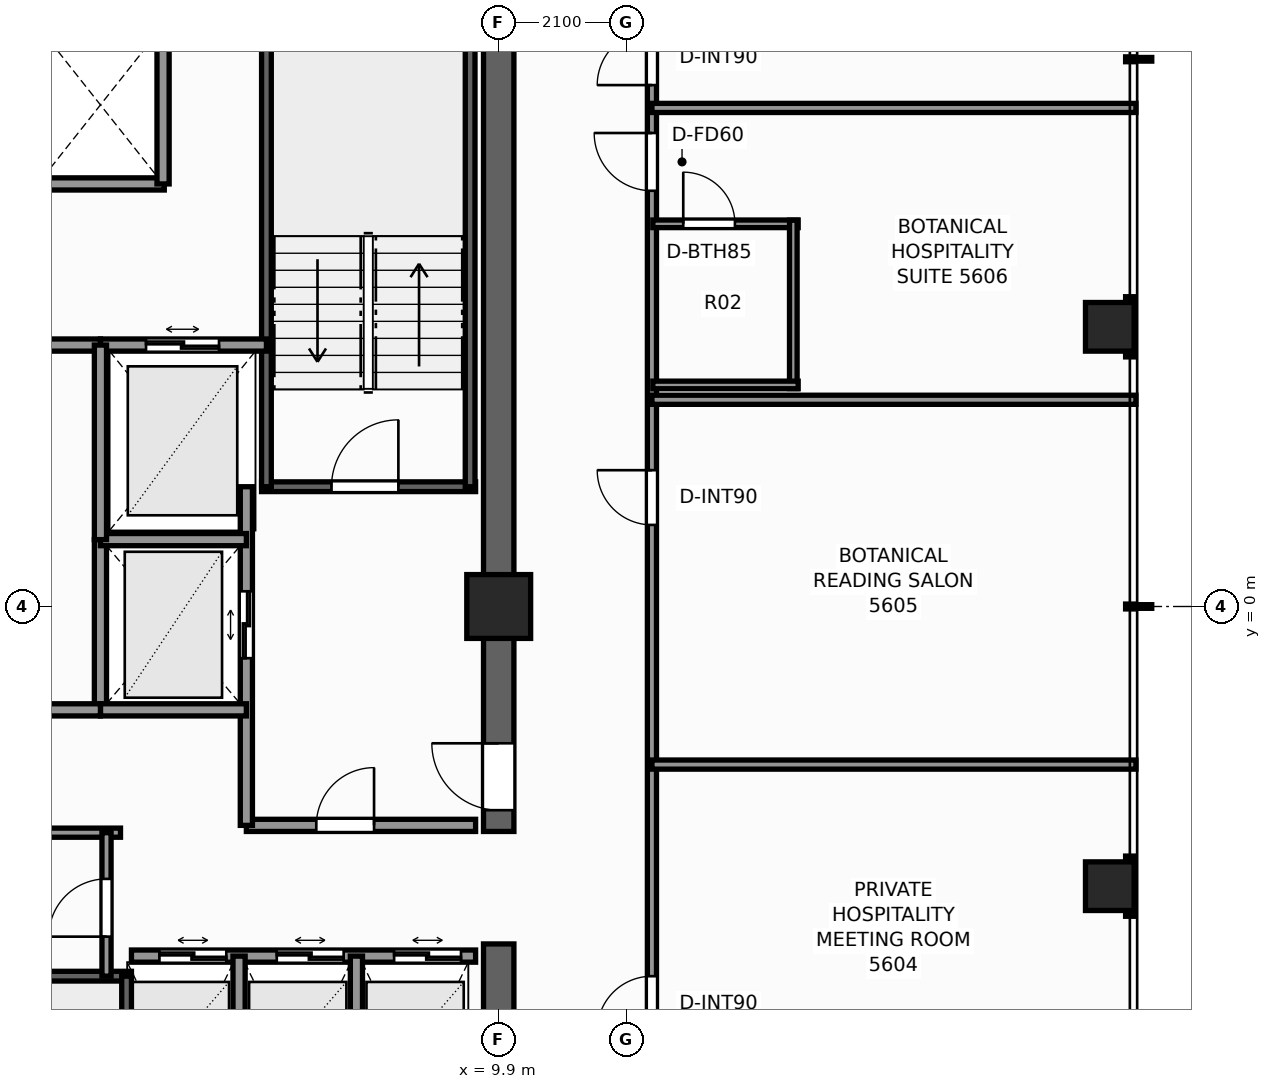
"""IFC4 building model, lengths in metres.
Left out: names, types, materials, properties, quantities, classifications, styles, units other than length and angle.
Written with IfcOpenShell. Run it as: python <this file> out.ifc"""

import sys

from ifc_helpers import new_model, si_unit, direction, frame, frame_2d, origin, origin_2d, place, context, subcontext, project, spatial, rectangle, extrude, element, fill, save


model = new_model("IFC4")
c1 = context("Model", 3, precision=1e-05, world=origin(), true_north=direction((0.0, 1.0)))
c2 = subcontext(c1, "Body", "Model", "MODEL_VIEW")
j1 = project(units=[si_unit("LENGTHUNIT", "METRE"), si_unit("PLANEANGLEUNIT", "RADIAN")], contexts=[c1])
p1 = place(None, origin())
s1 = spatial("IfcSite", under=j1, at=p1, CompositionType="ELEMENT")
p2 = place(p1, origin())
s2 = spatial("IfcBuilding", under=s1, at=p2, CompositionType="ELEMENT")
p3 = place(p2, frame((0.0, 0.0, 193.2)))
s3 = spatial("IfcBuildingStorey", under=s2, at=p3, CompositionType="ELEMENT", Elevation=193.2)
p4 = place(p3, frame((9.9, -9.65, 0.0), z_axis=(0.0, 0.0, 1.0), x_axis=(0.0, 1.0, 0.0)))
e1 = element("IfcWall", 1, at=p4, inside=s3, PredefinedType="SHEAR", context=c2, shape_type="SweptSolid", body=[
    extrude(rectangle(XDim=4.1, YDim=0.5, at=frame_2d((2.05, 0.0))), origin(), (0.0, 0.0, 1.0), 3.3),
])
p5 = place(p3, frame((9.9, -3.7, 0.0), z_axis=(0.0, 0.0, 1.0), x_axis=(0.0, 1.0, 0.0)))
e2 = element("IfcWall", 2, at=p5, inside=s3, PredefinedType="SHEAR", context=c2, shape_type="SweptSolid", body=[
    extrude(rectangle(XDim=13.35, YDim=0.5, at=frame_2d((6.675, 0.0))), origin(), (0.0, 0.0, 1.0), 3.3),
])
p6 = place(p5, frame((0.35, 0.0, 0.0)))
e3 = element("IfcOpeningElement", 3, at=p6, cuts=e2, PredefinedType="OPENING", context=c2, shape_type="SweptSolid", body=[
    extrude(rectangle(XDim=1.1, YDim=2.2, at=frame_2d((0.55, 1.1))), frame((0.0, 0.26, 0.0), z_axis=(0.0, -1.0, 0.0), x_axis=(1.0, 0.0, 0.0)), (0.0, 0.0, 1.0), 0.52),
])
p7 = place(p3, frame((9.9, 0.0, 0.0), z_axis=(0.0, 0.0, 1.0), x_axis=(1.0, 0.0, 0.0)))
e4 = element("IfcColumn", 4, at=p7, inside=s3, PredefinedType="COLUMN", context=c2, shape_type="SweptSolid", body=[
    extrude(rectangle(XDim=1.05, YDim=1.05, at=origin_2d()), origin(), (0.0, 0.0, 1.0), 3.3),
])
for number, where, z_axis, x_axis in (
    (5, (19.95, -4.6, 0.0), (0.0, 0.0, 1.0), (1.0, 0.0, 0.0)),
    (6, (19.95, 4.6, 0.0), (0.0, 0.0, 1.0), (1.0, 0.0, 0.0)),
):
    element("IfcColumn", number, at=place(p3, frame(where, z_axis=z_axis, x_axis=x_axis)), inside=s3, PredefinedType="COLUMN", context=c2, shape_type="SweptSolid", body=[
        extrude(rectangle(XDim=0.8, YDim=0.8, at=origin_2d()), origin(), (0.0, 0.0, 1.0), 3.3),
    ])
p8 = place(p3, frame((6.0, 1.97, 0.0), z_axis=(0.0, 0.0, 1.0), x_axis=(1.0, 0.0, 0.0)))
e7 = element("IfcWall", 7, at=p8, inside=s3, PredefinedType="SHEAR", context=c2, shape_type="SweptSolid", body=[
    extrude(rectangle(XDim=3.52, YDim=0.16, at=frame_2d((1.76, 0.0))), origin(), (0.0, 0.0, 1.0), 3.3),
])
p9 = place(p8, frame((1.15, 0.0, 0.0)))
e8 = element("IfcOpeningElement", 8, at=p9, cuts=e7, PredefinedType="OPENING", context=c2, shape_type="SweptSolid", body=[
    extrude(rectangle(XDim=1.1, YDim=2.2, at=frame_2d((0.55, 1.1))), frame((0.0, 0.09, 0.0), z_axis=(0.0, -1.0, 0.0), x_axis=(1.0, 0.0, 0.0)), (0.0, 0.0, 1.0), 0.18),
])
for number, where, z_axis, x_axis in (
    (9, (6.08, 1.97, 0.0), (0.0, 0.0, 1.0), (0.0, 1.0, 0.0)),
    (10, (9.43, 1.97, 0.0), (0.0, 0.0, 1.0), (0.0, 1.0, 0.0)),
):
    element("IfcWall", number, at=place(p3, frame(where, z_axis=z_axis, x_axis=x_axis)), inside=s3, PredefinedType="SHEAR", context=c2, shape_type="SweptSolid", body=[
        extrude(rectangle(XDim=7.56, YDim=0.16, at=frame_2d((3.78, 0.0))), origin(), (0.0, 0.0, 1.0), 3.3),
    ])
p10 = place(p3, frame((-3.86, -6.08, 0.0), z_axis=(0.0, 0.0, 1.0), x_axis=(1.0, 0.0, 0.0)))
e11 = element("IfcWall", 11, at=p10, inside=s3, PredefinedType="SHEAR", context=c2, shape_type="SweptSolid", body=[
    extrude(rectangle(XDim=7.72, YDim=0.16, at=frame_2d((3.86, 0.0))), origin(), (0.0, 0.0, 1.0), 3.3),
])
p11 = place(p3, frame((3.78, -9.43, 0.0), z_axis=(0.0, 0.0, 1.0), x_axis=(0.0, 1.0, 0.0)))
e12 = element("IfcWall", 12, at=p11, inside=s3, PredefinedType="SHEAR", context=c2, shape_type="SweptSolid", body=[
    extrude(rectangle(XDim=3.35, YDim=0.16, at=frame_2d((1.675, 0.0))), origin(), (0.0, 0.0, 1.0), 3.3),
])
p12 = place(p3, frame((5.75, -3.6, 0.0), z_axis=(0.0, 0.0, 1.0), x_axis=(1.0, 0.0, 0.0)))
e13 = element("IfcWall", 13, at=p12, inside=s3, PredefinedType="SOLIDWALL", context=c2, shape_type="SweptSolid", body=[
    extrude(rectangle(XDim=3.77, YDim=0.2, at=frame_2d((1.885, 0.0))), origin(), (0.0, 0.0, 1.0), 3.08),
])
p13 = place(p12, frame((1.15, 0.0, 0.0)))
e14 = element("IfcOpeningElement", 14, at=p13, cuts=e13, PredefinedType="OPENING", context=c2, shape_type="SweptSolid", body=[
    extrude(rectangle(XDim=0.95, YDim=2.06, at=frame_2d((0.475, 1.03))), frame((0.0, 0.11, 0.0), z_axis=(0.0, -1.0, 0.0), x_axis=(1.0, 0.0, 0.0)), (0.0, 0.0, 1.0), 0.22),
])
p14 = place(p3, frame((5.75, -3.6, 0.0), z_axis=(0.0, 0.0, 1.0), x_axis=(0.0, 1.0, 0.0)))
e15 = element("IfcWall", 15, at=p14, inside=s3, PredefinedType="SOLIDWALL", context=c2, shape_type="SweptSolid", body=[
    extrude(rectangle(XDim=5.57, YDim=0.2, at=frame_2d((2.785, 0.0))), origin(), (0.0, 0.0, 1.0), 3.08),
])
p15 = place(p14, frame((2.75, 0.0, 0.0)))
e16 = element("IfcOpeningElement", 16, at=p15, cuts=e15, PredefinedType="OPENING", context=c2, shape_type="SweptSolid", body=[
    extrude(rectangle(XDim=1.1, YDim=2.2, at=frame_2d((0.55, 1.1))), frame((0.0, 0.11, 0.0), z_axis=(0.0, -1.0, 0.0), x_axis=(1.0, 0.0, 0.0)), (0.0, 0.0, 1.0), 0.22),
])
p16 = place(p3, frame((3.35, -1.7, 0.0), z_axis=(0.0, 0.0, 1.0), x_axis=(0.0, 1.0, 0.0)))
e17 = element("IfcWall", 17, at=p16, inside=s3, PredefinedType="SOLIDWALL", context=c2, shape_type="SweptSolid", body=[
    extrude(rectangle(XDim=2.8, YDim=0.2, at=frame_2d((1.4, 0.0))), origin(), (0.0, 0.0, 1.0), 3.08),
])
for number, where, z_axis, x_axis in (
    (18, (3.35, -1.7, 0.0), (0.0, 0.0, 1.0), (1.0, 0.0, 0.0)),
    (19, (3.35, 1.1, 0.0), (0.0, 0.0, 1.0), (1.0, 0.0, 0.0)),
):
    element("IfcWall", number, at=place(p3, frame(where, z_axis=z_axis, x_axis=x_axis)), inside=s3, PredefinedType="SOLIDWALL", context=c2, shape_type="SweptSolid", body=[
        extrude(rectangle(XDim=2.4, YDim=0.2, at=frame_2d((1.2, 0.0))), origin(), (0.0, 0.0, 1.0), 3.08),
    ])
p17 = place(p3, frame((3.35, 4.3, 0.0), z_axis=(0.0, 0.0, 1.0), x_axis=(1.0, 0.0, 0.0)))
e20 = element("IfcWall", 20, at=p17, inside=s3, PredefinedType="SOLIDWALL", context=c2, shape_type="SweptSolid", body=[
    extrude(rectangle(XDim=2.73, YDim=0.2, at=frame_2d((1.365, 0.0))), origin(), (0.0, 0.0, 1.0), 3.08),
])
p18 = place(p17, frame((0.75, 0.0, 0.0)))
e21 = element("IfcOpeningElement", 21, at=p18, cuts=e20, PredefinedType="OPENING", context=c2, shape_type="SweptSolid", body=[
    extrude(rectangle(XDim=1.2, YDim=2.25, at=frame_2d((0.6, 1.125))), frame((0.0, 0.11, 0.0), z_axis=(0.0, -1.0, 0.0), x_axis=(1.0, 0.0, 0.0)), (0.0, 0.0, 1.0), 0.22),
])
p19 = place(p3, frame((0.22, 6.95, 0.0), z_axis=(0.0, 0.0, 1.0), x_axis=(1.0, 0.0, 0.0)))
e22 = element("IfcWall", 22, at=p19, inside=s3, PredefinedType="SOLIDWALL", context=c2, shape_type="SweptSolid", body=[
    extrude(rectangle(XDim=4.18, YDim=0.2, at=frame_2d((2.09, 0.0))), origin(), (0.0, 0.0, 1.0), 3.08),
])
p20 = place(p3, frame((4.38, 6.95, 0.0), z_axis=(0.0, 0.0, 1.0), x_axis=(0.0, 1.0, 0.0)))
e23 = element("IfcWall", 23, at=p20, inside=s3, PredefinedType="SOLIDWALL", context=c2, shape_type="SweptSolid", body=[
    extrude(rectangle(XDim=2.57, YDim=0.2, at=frame_2d((1.285, 0.0))), origin(), (0.0, 0.0, 1.0), 3.08),
])
p21 = place(p3, frame((3.86, -5.75, 0.0), z_axis=(0.0, 0.0, 1.0), x_axis=(1.0, 0.0, 0.0)))
e24 = element("IfcWall", 24, at=p21, inside=s3, PredefinedType="SOLIDWALL", context=c2, shape_type="SweptSolid", body=[
    extrude(rectangle(XDim=5.66, YDim=0.2, at=frame_2d((2.83, 0.0))), origin(), (0.0, 0.0, 1.0), 3.08),
])
p22 = place(p21, frame((0.46, 0.0, 0.0)))
e25 = element("IfcOpeningElement", 25, at=p22, cuts=e24, PredefinedType="OPENING", context=c2, shape_type="SweptSolid", body=[
    extrude(rectangle(XDim=1.1, YDim=2.2, at=frame_2d((0.55, 1.1))), frame((0.0, 0.11, 0.0), z_axis=(0.0, -1.0, 0.0), x_axis=(1.0, 0.0, 0.0)), (0.0, 0.0, 1.0), 0.22),
])
p23 = place(p21, frame((2.39, 0.0, 0.0)))
e26 = element("IfcOpeningElement", 26, at=p23, cuts=e24, PredefinedType="OPENING", context=c2, shape_type="SweptSolid", body=[
    extrude(rectangle(XDim=1.1, YDim=2.2, at=frame_2d((0.55, 1.1))), frame((0.0, 0.11, 0.0), z_axis=(0.0, -1.0, 0.0), x_axis=(1.0, 0.0, 0.0)), (0.0, 0.0, 1.0), 0.22),
])
p24 = place(p21, frame((4.32, 0.0, 0.0)))
e27 = element("IfcOpeningElement", 27, at=p24, cuts=e24, PredefinedType="OPENING", context=c2, shape_type="SweptSolid", body=[
    extrude(rectangle(XDim=1.1, YDim=2.2, at=frame_2d((0.55, 1.1))), frame((0.0, 0.11, 0.0), z_axis=(0.0, -1.0, 0.0), x_axis=(1.0, 0.0, 0.0)), (0.0, 0.0, 1.0), 0.22),
])
for number, where, z_axis, x_axis in (
    (28, (5.63, -9.52, 0.0), (0.0, 0.0, 1.0), (0.0, 1.0, 0.0)),
    (29, (7.56, -9.52, 0.0), (0.0, 0.0, 1.0), (0.0, 1.0, 0.0)),
):
    element("IfcWall", number, at=place(p3, frame(where, z_axis=z_axis, x_axis=x_axis)), inside=s3, PredefinedType="SOLIDWALL", context=c2, shape_type="SweptSolid", body=[
        extrude(rectangle(XDim=3.77, YDim=0.2, at=frame_2d((1.885, 0.0))), origin(), (0.0, 0.0, 1.0), 3.08),
    ])
p25 = place(p3, frame((0.22, 4.3, 0.0), z_axis=(0.0, 0.0, 1.0), x_axis=(1.0, 0.0, 0.0)))
e30 = element("IfcWall", 30, at=p25, inside=s3, PredefinedType="SOLIDWALL", context=c2, shape_type="SweptSolid", body=[
    extrude(rectangle(XDim=3.13, YDim=0.2, at=frame_2d((1.565, 0.0))), origin(), (0.0, 0.0, 1.0), 3.08),
])
p26 = place(p25, frame((1.05, 0.0, 0.0)))
e31 = element("IfcOpeningElement", 31, at=p26, cuts=e30, PredefinedType="OPENING", context=c2, shape_type="SweptSolid", body=[
    extrude(rectangle(XDim=0.95, YDim=2.06, at=frame_2d((0.475, 1.03))), frame((0.0, 0.11, 0.0), z_axis=(0.0, -1.0, 0.0), x_axis=(1.0, 0.0, 0.0)), (0.0, 0.0, 1.0), 0.22),
])
p27 = place(p3, frame((-3.35, -1.7, 0.0), z_axis=(0.0, 0.0, 1.0), x_axis=(1.0, 0.0, 0.0)))
e32 = element("IfcWall", 32, at=p27, inside=s3, PredefinedType="SOLIDWALL", context=c2, shape_type="SweptSolid", body=[
    extrude(rectangle(XDim=6.7, YDim=0.2, at=frame_2d((3.35, 0.0))), origin(), (0.0, 0.0, 1.0), 3.08),
])
p28 = place(p3, frame((3.35, 1.1, 0.0), z_axis=(0.0, 0.0, 1.0), x_axis=(0.0, 1.0, 0.0)))
e33 = element("IfcWall", 33, at=p28, inside=s3, PredefinedType="SOLIDWALL", context=c2, shape_type="SweptSolid", body=[
    extrude(rectangle(XDim=3.2, YDim=0.2, at=frame_2d((1.6, 0.0))), origin(), (0.0, 0.0, 1.0), 3.08),
])
p29 = place(p3, frame((-3.68, -3.72, 0.0), z_axis=(0.0, 0.0, 1.0), x_axis=(1.0, 0.0, 0.0)))
e34 = element("IfcWall", 34, at=p29, inside=s3, PredefinedType="PARTITIONING", context=c2, shape_type="SweptSolid", body=[
    extrude(rectangle(XDim=7.36, YDim=0.15, at=frame_2d((3.68, 0.0))), origin(), (0.0, 0.0, 1.0), 3.08),
])
p30 = place(p3, frame((3.45, -6.08, 0.0), z_axis=(0.0, 0.0, 1.0), x_axis=(0.0, 1.0, 0.0)))
e35 = element("IfcWall", 35, at=p30, inside=s3, PredefinedType="PARTITIONING", context=c2, shape_type="SweptSolid", body=[
    extrude(rectangle(XDim=2.36, YDim=0.15, at=frame_2d((1.18, 0.0))), origin(), (0.0, 0.0, 1.0), 3.08),
])
p31 = place(p30, frame((0.65, 0.0, 0.0)))
e36 = element("IfcOpeningElement", 36, at=p31, cuts=e35, PredefinedType="OPENING", context=c2, shape_type="SweptSolid", body=[
    extrude(rectangle(XDim=0.95, YDim=2.06, at=frame_2d((0.475, 1.03))), frame((0.0, 0.085, 0.0), z_axis=(0.0, -1.0, 0.0), x_axis=(1.0, 0.0, 0.0)), (0.0, 0.0, 1.0), 0.17),
])
p32 = place(p3, frame((12.42, -12.26, 0.0), z_axis=(0.0, 0.0, 1.0), x_axis=(0.0, 1.0, 0.0)))
e37 = element("IfcWall", 37, at=p32, inside=s3, PredefinedType="PARTITIONING", context=c2, shape_type="SweptSolid", body=[
    extrude(rectangle(XDim=24.84, YDim=0.15, at=frame_2d((12.42, 0.0))), origin(), (0.0, 0.0, 1.0), 2.369),
])
p33 = place(p32, frame((2.944, 0.0, 0.0)))
e38 = element("IfcOpeningElement", 38, at=p33, cuts=e37, PredefinedType="OPENING", context=c2, shape_type="SweptSolid", body=[
    extrude(rectangle(XDim=0.9, YDim=2.06, at=frame_2d((0.45, 1.03))), frame((0.0, 0.085, 0.0), z_axis=(0.0, -1.0, 0.0), x_axis=(1.0, 0.0, 0.0)), (0.0, 0.0, 1.0), 0.17),
])
p34 = place(p32, frame((5.279, 0.0, 0.0)))
e39 = element("IfcOpeningElement", 39, at=p34, cuts=e37, PredefinedType="OPENING", context=c2, shape_type="SweptSolid", body=[
    extrude(rectangle(XDim=0.9, YDim=2.06, at=frame_2d((0.45, 1.03))), frame((0.0, 0.085, 0.0), z_axis=(0.0, -1.0, 0.0), x_axis=(1.0, 0.0, 0.0)), (0.0, 0.0, 1.0), 0.17),
])
p35 = place(p32, frame((13.602, 0.0, 0.0)))
e40 = element("IfcOpeningElement", 40, at=p35, cuts=e37, PredefinedType="OPENING", context=c2, shape_type="SweptSolid", body=[
    extrude(rectangle(XDim=0.9, YDim=2.06, at=frame_2d((0.45, 1.03))), frame((0.0, 0.085, 0.0), z_axis=(0.0, -1.0, 0.0), x_axis=(1.0, 0.0, 0.0)), (0.0, 0.0, 1.0), 0.17),
])
p36 = place(p32, frame((19.098, 0.0, 0.0)))
e41 = element("IfcOpeningElement", 41, at=p36, cuts=e37, PredefinedType="OPENING", context=c2, shape_type="SweptSolid", body=[
    extrude(rectangle(XDim=0.95, YDim=2.06, at=frame_2d((0.475, 1.03))), frame((0.0, 0.085, 0.0), z_axis=(0.0, -1.0, 0.0), x_axis=(1.0, 0.0, 0.0)), (0.0, 0.0, 1.0), 0.17),
])
p37 = place(p32, frame((20.836, 0.0, 0.0)))
e42 = element("IfcOpeningElement", 42, at=p37, cuts=e37, PredefinedType="OPENING", context=c2, shape_type="SweptSolid", body=[
    extrude(rectangle(XDim=0.9, YDim=2.06, at=frame_2d((0.45, 1.03))), frame((0.0, 0.085, 0.0), z_axis=(0.0, -1.0, 0.0), x_axis=(1.0, 0.0, 0.0)), (0.0, 0.0, 1.0), 0.17),
])
for number, where, z_axis, x_axis in (
    (43, (12.42, -2.6, 0.0), (0.0, 0.0, 1.0), (1.0, 0.0, 0.0)),
    (44, (12.42, 3.4, 0.0), (0.0, 0.0, 1.0), (1.0, 0.0, 0.0)),
    (45, (12.42, 8.2, 0.0), (0.0, 0.0, 1.0), (1.0, 0.0, 0.0)),
):
    element("IfcWall", number, at=place(p3, frame(where, z_axis=z_axis, x_axis=x_axis)), inside=s3, PredefinedType="PARTITIONING", context=c2, shape_type="SweptSolid", body=[
        extrude(rectangle(XDim=7.96, YDim=0.15, at=frame_2d((3.98, 0.0))), origin(), (0.0, 0.0, 1.0), 2.453),
    ])
p38 = place(p3, frame((12.435, 6.294, 0.0), z_axis=(0.0, 0.0, 1.0), x_axis=(1.0, 0.0, 0.0)))
e46 = element("IfcWall", 46, at=p38, inside=s3, PredefinedType="PARTITIONING", context=c2, shape_type="SweptSolid", body=[
    extrude(rectangle(XDim=2.39, YDim=0.125, at=frame_2d((1.195, 0.0))), origin(), (0.0, 0.0, 1.0), 3.08),
])
p39 = place(p38, frame((0.5, 0.0, 0.0)))
e47 = element("IfcOpeningElement", 47, at=p39, cuts=e46, PredefinedType="OPENING", context=c2, shape_type="SweptSolid", body=[
    extrude(rectangle(XDim=0.85, YDim=2.03, at=frame_2d((0.425, 1.015))), frame((0.0, 0.073, 0.0), z_axis=(0.0, -1.0, 0.0), x_axis=(1.0, 0.0, 0.0)), (0.0, 0.0, 1.0), 0.145),
])
p40 = place(p3, frame((14.745, 3.584, 0.0), z_axis=(0.0, 0.0, 1.0), x_axis=(0.0, 1.0, 0.0)))
e48 = element("IfcWall", 48, at=p40, inside=s3, PredefinedType="PARTITIONING", context=c2, shape_type="SweptSolid", body=[
    extrude(rectangle(XDim=2.77, YDim=0.125, at=frame_2d((1.385, 0.0))), origin(), (0.0, 0.0, 1.0), 2.369),
])
p41 = place(p3, frame((12.435, 3.644, 0.0), z_axis=(0.0, 0.0, 1.0), x_axis=(1.0, 0.0, 0.0)))
e49 = element("IfcWall", 49, at=p41, inside=s3, PredefinedType="PARTITIONING", context=c2, shape_type="SweptSolid", body=[
    extrude(rectangle(XDim=2.39, YDim=0.125, at=frame_2d((1.195, 0.0))), origin(), (0.0, 0.0, 1.0), 3.08),
])
p42 = place(p9, origin())
e50 = element("IfcDoor", 50, at=p42, inside=s3, OperationType="SINGLE_SWING_RIGHT", PredefinedType="DOOR", context=c2, shape_type="SweptSolid", body=[
    extrude(rectangle(XDim=1.1, YDim=2.2, at=frame_2d((0.55, 1.1))), frame((0.0, 0.025, 0.0), z_axis=(0.0, -1.0, 0.0), x_axis=(1.0, 0.0, 0.0)), (0.0, 0.0, 1.0), 0.05),
])
fill(e8, e50)
p43 = place(p6, origin())
e51 = element("IfcDoor", 51, at=p43, inside=s3, OperationType="SINGLE_SWING_RIGHT", PredefinedType="DOOR", context=c2, shape_type="SweptSolid", body=[
    extrude(rectangle(XDim=1.1, YDim=2.2, at=frame_2d((0.55, 1.1))), frame((0.0, 0.025, 0.0), z_axis=(0.0, -1.0, 0.0), x_axis=(1.0, 0.0, 0.0)), (0.0, 0.0, 1.0), 0.05),
])
fill(e3, e51)
p44 = place(p15, origin())
e52 = element("IfcDoor", 52, at=p44, inside=s3, OperationType="DOUBLE_DOOR_SLIDING", PredefinedType="DOOR", context=c2, shape_type="SweptSolid", body=[
    extrude(rectangle(XDim=1.1, YDim=2.2, at=frame_2d((0.55, 1.1))), frame((0.0, 0.025, 0.0), z_axis=(0.0, -1.0, 0.0), x_axis=(1.0, 0.0, 0.0)), (0.0, 0.0, 1.0), 0.05),
])
fill(e16, e52)
p45 = place(p18, origin())
e53 = element("IfcDoor", 53, at=p45, inside=s3, OperationType="DOUBLE_DOOR_SLIDING", PredefinedType="DOOR", context=c2, shape_type="SweptSolid", body=[
    extrude(rectangle(XDim=1.2, YDim=2.25, at=frame_2d((0.6, 1.125))), frame((0.0, 0.025, 0.0), z_axis=(0.0, -1.0, 0.0), x_axis=(1.0, 0.0, 0.0)), (0.0, 0.0, 1.0), 0.05),
])
fill(e21, e53)
p46 = place(p22, origin())
e54 = element("IfcDoor", 54, at=p46, inside=s3, OperationType="DOUBLE_DOOR_SLIDING", PredefinedType="DOOR", context=c2, shape_type="SweptSolid", body=[
    extrude(rectangle(XDim=1.1, YDim=2.2, at=frame_2d((0.55, 1.1))), frame((0.0, 0.025, 0.0), z_axis=(0.0, -1.0, 0.0), x_axis=(1.0, 0.0, 0.0)), (0.0, 0.0, 1.0), 0.05),
])
fill(e25, e54)
p47 = place(p23, origin())
e55 = element("IfcDoor", 55, at=p47, inside=s3, OperationType="DOUBLE_DOOR_SLIDING", PredefinedType="DOOR", context=c2, shape_type="SweptSolid", body=[
    extrude(rectangle(XDim=1.1, YDim=2.2, at=frame_2d((0.55, 1.1))), frame((0.0, 0.025, 0.0), z_axis=(0.0, -1.0, 0.0), x_axis=(1.0, 0.0, 0.0)), (0.0, 0.0, 1.0), 0.05),
])
fill(e26, e55)
p48 = place(p24, origin())
e56 = element("IfcDoor", 56, at=p48, inside=s3, OperationType="DOUBLE_DOOR_SLIDING", PredefinedType="DOOR", context=c2, shape_type="SweptSolid", body=[
    extrude(rectangle(XDim=1.1, YDim=2.2, at=frame_2d((0.55, 1.1))), frame((0.0, 0.025, 0.0), z_axis=(0.0, -1.0, 0.0), x_axis=(1.0, 0.0, 0.0)), (0.0, 0.0, 1.0), 0.05),
])
fill(e27, e56)
p49 = place(p13, origin())
e57 = element("IfcDoor", 57, at=p49, inside=s3, OperationType="SINGLE_SWING_RIGHT", PredefinedType="DOOR", context=c2, shape_type="SweptSolid", body=[
    extrude(rectangle(XDim=0.95, YDim=2.06, at=frame_2d((0.475, 1.03))), frame((0.0, 0.025, 0.0), z_axis=(0.0, -1.0, 0.0), x_axis=(1.0, 0.0, 0.0)), (0.0, 0.0, 1.0), 0.05),
])
fill(e14, e57)
p50 = place(p31, origin())
e58 = element("IfcDoor", 58, at=p50, inside=s3, OperationType="SINGLE_SWING_LEFT", PredefinedType="DOOR", context=c2, shape_type="SweptSolid", body=[
    extrude(rectangle(XDim=0.95, YDim=2.06, at=frame_2d((0.475, 1.03))), frame((0.0, 0.025, 0.0), z_axis=(0.0, -1.0, 0.0), x_axis=(1.0, 0.0, 0.0)), (0.0, 0.0, 1.0), 0.05),
])
fill(e36, e58)
p51 = place(p34, origin())
e59 = element("IfcDoor", 59, at=p51, inside=s3, OperationType="SINGLE_SWING_LEFT", PredefinedType="DOOR", context=c2, shape_type="SweptSolid", body=[
    extrude(rectangle(XDim=0.9, YDim=2.06, at=frame_2d((0.45, 1.03))), frame((0.0, 0.025, 0.0), z_axis=(0.0, -1.0, 0.0), x_axis=(1.0, 0.0, 0.0)), (0.0, 0.0, 1.0), 0.05),
])
fill(e39, e59)
p52 = place(p35, origin())
e60 = element("IfcDoor", 60, at=p52, inside=s3, OperationType="SINGLE_SWING_RIGHT", PredefinedType="DOOR", context=c2, shape_type="SweptSolid", body=[
    extrude(rectangle(XDim=0.9, YDim=2.06, at=frame_2d((0.45, 1.03))), frame((0.0, 0.025, 0.0), z_axis=(0.0, -1.0, 0.0), x_axis=(1.0, 0.0, 0.0)), (0.0, 0.0, 1.0), 0.05),
])
fill(e40, e60)
p53 = place(p39, origin())
e61 = element("IfcDoor", 61, at=p53, inside=s3, OperationType="SINGLE_SWING_LEFT", PredefinedType="DOOR", context=c2, shape_type="SweptSolid", body=[
    extrude(rectangle(XDim=0.85, YDim=2.03, at=frame_2d((0.425, 1.015))), frame((0.0, 0.025, 0.0), z_axis=(0.0, -1.0, 0.0), x_axis=(1.0, 0.0, 0.0)), (0.0, 0.0, 1.0), 0.05),
])
fill(e47, e61)
p54 = place(p36, origin())
e62 = element("IfcDoor", 62, at=p54, inside=s3, OperationType="SINGLE_SWING_RIGHT", PredefinedType="DOOR", context=c2, shape_type="SweptSolid", body=[
    extrude(rectangle(XDim=0.95, YDim=2.06, at=frame_2d((0.475, 1.03))), frame((0.0, 0.025, 0.0), z_axis=(0.0, -1.0, 0.0), x_axis=(1.0, 0.0, 0.0)), (0.0, 0.0, 1.0), 0.05),
])
fill(e41, e62)
p55 = place(p37, origin())
e63 = element("IfcDoor", 63, at=p55, inside=s3, OperationType="SINGLE_SWING_LEFT", PredefinedType="DOOR", context=c2, shape_type="SweptSolid", body=[
    extrude(rectangle(XDim=0.9, YDim=2.06, at=frame_2d((0.45, 1.03))), frame((0.0, 0.025, 0.0), z_axis=(0.0, -1.0, 0.0), x_axis=(1.0, 0.0, 0.0)), (0.0, 0.0, 1.0), 0.05),
])
fill(e42, e63)
save(model, sys.argv[1])
